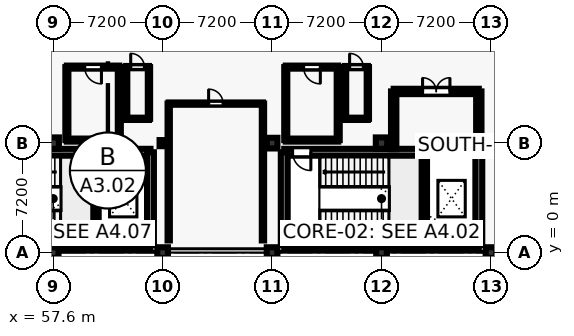
"""IFC4 building model, lengths in metres.
Left out: names, types, materials, properties, quantities, classifications, styles, units other than length and angle.
Written with IfcOpenShell. Run it as: python <this file> out.ifc"""

import sys

from ifc_helpers import new_model, si_unit, direction, frame, frame_2d, origin, origin_2d, place, context, subcontext, project, spatial, rectangle, hollow_rectangle, extrude, element, fill, save


model = new_model("IFC4")
c1 = context("Model", 3, precision=1e-05, world=origin(), true_north=direction((0.0, 1.0)))
c2 = subcontext(c1, "Body", "Model", "MODEL_VIEW")
j1 = project(units=[si_unit("LENGTHUNIT", "METRE"), si_unit("PLANEANGLEUNIT", "RADIAN")], contexts=[c1])
p1 = place(None, origin())
s1 = spatial("IfcSite", under=j1, at=p1, CompositionType="ELEMENT")
p2 = place(p1, origin())
s2 = spatial("IfcBuilding", under=s1, at=p2, CompositionType="ELEMENT")
p3 = place(p2, frame((0.0, 0.0, 9.6)))
s3 = spatial("IfcBuildingStorey", under=s2, at=p3, CompositionType="ELEMENT", Elevation=9.6)
p4 = place(p3, frame((57.6, 0.0, 0.0), z_axis=(0.0, 0.0, 1.0), x_axis=(1.0, 0.0, 0.0)))
e1 = element("IfcColumn", 1, at=p4, inside=s3, PredefinedType="COLUMN", context=c2, shape_type="SweptSolid", body=[
    extrude(rectangle(XDim=0.7, YDim=0.7, at=origin_2d()), origin(), (0.0, 0.0, 1.0), 4.2),
])
p5 = place(p3, frame((57.6, 7.2, 0.0), z_axis=(0.0, 0.0, 1.0), x_axis=(1.0, 0.0, 0.0)))
e2 = element("IfcColumn", 2, at=p5, inside=s3, PredefinedType="COLUMN", context=c2, shape_type="SweptSolid", body=[
    extrude(rectangle(XDim=0.75, YDim=0.75, at=origin_2d()), origin(), (0.0, 0.0, 1.0), 4.2),
])
p6 = place(p3, frame((64.8, 0.0, 0.0), z_axis=(0.0, 0.0, 1.0), x_axis=(1.0, 0.0, 0.0)))
e3 = element("IfcColumn", 3, at=p6, inside=s3, PredefinedType="COLUMN", context=c2, shape_type="SweptSolid", body=[
    extrude(rectangle(XDim=0.7, YDim=0.7, at=origin_2d()), origin(), (0.0, 0.0, 1.0), 4.2),
])
p7 = place(p3, frame((64.8, 7.2, 0.0), z_axis=(0.0, 0.0, 1.0), x_axis=(1.0, 0.0, 0.0)))
e4 = element("IfcColumn", 4, at=p7, inside=s3, PredefinedType="COLUMN", context=c2, shape_type="SweptSolid", body=[
    extrude(hollow_rectangle(XDim=0.4, YDim=0.4, WallThickness=0.02, at=origin_2d()), origin(), (0.0, 0.0, 1.0), 4.2),
])
for number, where, z_axis, x_axis in (
    (5, (72.0, 0.0, 0.0), (0.0, 0.0, 1.0), (1.0, 0.0, 0.0)),
    (6, (72.0, 7.2, 0.0), (0.0, 0.0, 1.0), (1.0, 0.0, 0.0)),
    (7, (79.2, 0.0, 0.0), (0.0, 0.0, 1.0), (1.0, 0.0, 0.0)),
):
    element("IfcColumn", number, at=place(p3, frame(where, z_axis=z_axis, x_axis=x_axis)), inside=s3, PredefinedType="COLUMN", context=c2, shape_type="SweptSolid", body=[
        extrude(rectangle(XDim=0.7, YDim=0.7, at=origin_2d()), origin(), (0.0, 0.0, 1.0), 4.2),
    ])
p8 = place(p3, frame((79.2, 7.2, 0.0), z_axis=(0.0, 0.0, 1.0), x_axis=(1.0, 0.0, 0.0)))
e8 = element("IfcColumn", 8, at=p8, inside=s3, PredefinedType="COLUMN", context=c2, shape_type="SweptSolid", body=[
    extrude(rectangle(XDim=0.75, YDim=0.75, at=origin_2d()), origin(), (0.0, 0.0, 1.0), 4.2),
])
p9 = place(p3, frame((86.4, 0.0, 0.0), z_axis=(0.0, 0.0, 1.0), x_axis=(1.0, 0.0, 0.0)))
e9 = element("IfcColumn", 9, at=p9, inside=s3, PredefinedType="COLUMN", context=c2, shape_type="SweptSolid", body=[
    extrude(rectangle(XDim=0.7, YDim=0.7, at=origin_2d()), origin(), (0.0, 0.0, 1.0), 4.2),
])
p10 = place(p3, frame((86.4, 7.2, 0.0), z_axis=(0.0, 0.0, 1.0), x_axis=(1.0, 0.0, 0.0)))
e10 = element("IfcColumn", 10, at=p10, inside=s3, PredefinedType="COLUMN", context=c2, shape_type="SweptSolid", body=[
    extrude(hollow_rectangle(XDim=0.4, YDim=0.4, WallThickness=0.02, at=origin_2d()), origin(), (0.0, 0.0, 1.0), 4.2),
])
p11 = place(p3, frame((72.8, 0.5, 0.0), z_axis=(0.0, 0.0, 1.0), x_axis=(1.0, 0.0, 0.0)))
e11 = element("IfcWall", 11, at=p11, inside=s3, PredefinedType="SHEAR", context=c2, shape_type="SweptSolid", body=[
    extrude(rectangle(XDim=12.8, YDim=0.45, at=frame_2d((6.4, 0.0))), origin(), (0.0, 0.0, 1.0), 3.88),
])
p12 = place(p3, frame((72.8, 6.6, 0.0), z_axis=(0.0, 0.0, 1.0), x_axis=(1.0, 0.0, 0.0)))
e12 = element("IfcWall", 12, at=p12, inside=s3, PredefinedType="SHEAR", context=c2, shape_type="SweptSolid", body=[
    extrude(rectangle(XDim=12.8, YDim=0.45, at=frame_2d((6.4, 0.0))), origin(), (0.0, 0.0, 1.0), 3.88),
])
p13 = place(p12, frame((0.55, 0.0, 0.0)))
e13 = element("IfcOpeningElement", 13, at=p13, cuts=e12, PredefinedType="OPENING", context=c2, shape_type="SweptSolid", body=[
    extrude(rectangle(XDim=1.2, YDim=2.25, at=frame_2d((0.6, 1.125))), frame((0.0, 0.235, 0.0), z_axis=(0.0, -1.0, 0.0), x_axis=(1.0, 0.0, 0.0)), (0.0, 0.0, 1.0), 0.47),
])
p14 = place(p12, frame((10.358, 0.0, 0.0)))
e14 = element("IfcOpeningElement", 14, at=p14, cuts=e12, PredefinedType="OPENING", context=c2, shape_type="SweptSolid", body=[
    extrude(rectangle(XDim=1.3, YDim=2.25, at=frame_2d((0.65, 1.125))), frame((0.0, 0.235, 0.0), z_axis=(0.0, -1.0, 0.0), x_axis=(1.0, 0.0, 0.0)), (0.0, 0.0, 1.0), 0.47),
])
for number, where, z_axis, x_axis in (
    (15, (72.8, 0.5, 0.0), (0.0, 0.0, 1.0), (0.0, 1.0, 0.0)),
    (16, (85.6, 0.5, 0.0), (0.0, 0.0, 1.0), (0.0, 1.0, 0.0)),
):
    element("IfcWall", number, at=place(p3, frame(where, z_axis=z_axis, x_axis=x_axis)), inside=s3, PredefinedType="SHEAR", context=c2, shape_type="SweptSolid", body=[
        extrude(rectangle(XDim=6.1, YDim=0.45, at=frame_2d((3.05, 0.0))), origin(), (0.0, 0.0, 1.0), 3.88),
    ])
p15 = place(p3, frame((82.016, 0.725, 0.0), z_axis=(0.0, 0.0, 1.0), x_axis=(0.0, 1.0, 0.0)))
e17 = element("IfcWall", 17, at=p15, inside=s3, PredefinedType="SHEAR", context=c2, shape_type="SweptSolid", body=[
    extrude(rectangle(XDim=5.65, YDim=0.35, at=frame_2d((2.825, 0.0))), origin(), (0.0, 0.0, 1.0), 3.88),
])
p16 = place(p3, frame((51.2, 0.5, 0.0), z_axis=(0.0, 0.0, 1.0), x_axis=(1.0, 0.0, 0.0)))
e18 = element("IfcWall", 18, at=p16, inside=s3, PredefinedType="SHEAR", context=c2, shape_type="SweptSolid", body=[
    extrude(rectangle(XDim=12.8, YDim=0.45, at=frame_2d((6.4, 0.0))), origin(), (0.0, 0.0, 1.0), 3.88),
])
p17 = place(p3, frame((51.2, 6.6, 0.0), z_axis=(0.0, 0.0, 1.0), x_axis=(1.0, 0.0, 0.0)))
e19 = element("IfcWall", 19, at=p17, inside=s3, PredefinedType="SHEAR", context=c2, shape_type="SweptSolid", body=[
    extrude(rectangle(XDim=12.8, YDim=0.45, at=frame_2d((6.4, 0.0))), origin(), (0.0, 0.0, 1.0), 3.88),
])
p18 = place(p17, frame((0.55, 0.0, 0.0)))
e20 = element("IfcOpeningElement", 20, at=p18, cuts=e19, PredefinedType="OPENING", context=c2, shape_type="SweptSolid", body=[
    extrude(rectangle(XDim=1.2, YDim=2.25, at=frame_2d((0.6, 1.125))), frame((0.0, 0.235, 0.0), z_axis=(0.0, -1.0, 0.0), x_axis=(1.0, 0.0, 0.0)), (0.0, 0.0, 1.0), 0.47),
])
p19 = place(p17, frame((10.458, 0.0, 0.0)))
e21 = element("IfcOpeningElement", 21, at=p19, cuts=e19, PredefinedType="OPENING", context=c2, shape_type="SweptSolid", body=[
    extrude(rectangle(XDim=1.1, YDim=2.2, at=frame_2d((0.55, 1.1))), frame((0.0, 0.235, 0.0), z_axis=(0.0, -1.0, 0.0), x_axis=(1.0, 0.0, 0.0)), (0.0, 0.0, 1.0), 0.47),
])
p20 = place(p3, frame((64.0, 0.5, 0.0), z_axis=(0.0, 0.0, 1.0), x_axis=(0.0, 1.0, 0.0)))
e22 = element("IfcWall", 22, at=p20, inside=s3, PredefinedType="SHEAR", context=c2, shape_type="SweptSolid", body=[
    extrude(rectangle(XDim=6.1, YDim=0.45, at=frame_2d((3.05, 0.0))), origin(), (0.0, 0.0, 1.0), 3.88),
])
p21 = place(p3, frame((60.416, 0.725, 0.0), z_axis=(0.0, 0.0, 1.0), x_axis=(0.0, 1.0, 0.0)))
e23 = element("IfcWall", 23, at=p21, inside=s3, PredefinedType="SHEAR", context=c2, shape_type="SweptSolid", body=[
    extrude(rectangle(XDim=5.65, YDim=0.35, at=frame_2d((2.825, 0.0))), origin(), (0.0, 0.0, 1.0), 3.88),
])
p22 = place(p3, frame((85.6, 6.8, 0.0), z_axis=(0.0, 0.0, 1.0), x_axis=(0.0, 1.0, 0.0)))
e24 = element("IfcWall", 24, at=p22, inside=s3, PredefinedType="SHEAR", context=c2, shape_type="SweptSolid", body=[
    extrude(rectangle(XDim=3.8, YDim=0.35, at=frame_2d((1.9, 0.0))), origin(), (0.0, 0.0, 1.0), 2.94),
])
p23 = place(p3, frame((85.6, 10.6, 0.0), z_axis=(0.0, 0.0, 1.0), x_axis=(-1.0, 0.0, 0.0)))
e25 = element("IfcWall", 25, at=p23, inside=s3, PredefinedType="SHEAR", context=c2, shape_type="SweptSolid", body=[
    extrude(rectangle(XDim=5.6, YDim=0.35, at=frame_2d((2.8, 0.0))), origin(), (0.0, 0.0, 1.0), 2.94),
])
p24 = place(p23, frame((1.9, 0.0, 0.0)))
e26 = element("IfcOpeningElement", 26, at=p24, cuts=e25, PredefinedType="OPENING", context=c2, shape_type="SweptSolid", body=[
    extrude(rectangle(XDim=1.8, YDim=2.3, at=frame_2d((0.9, 1.15))), frame((0.0, 0.185, 0.0), z_axis=(0.0, -1.0, 0.0), x_axis=(1.0, 0.0, 0.0)), (0.0, 0.0, 1.0), 0.37),
])
p25 = place(p3, frame((80.0, 10.6, 0.0), z_axis=(0.0, 0.0, 1.0), x_axis=(0.0, -1.0, 0.0)))
e27 = element("IfcWall", 27, at=p25, inside=s3, PredefinedType="SHEAR", context=c2, shape_type="SweptSolid", body=[
    extrude(rectangle(XDim=3.8, YDim=0.35, at=frame_2d((1.9, 0.0))), origin(), (0.0, 0.0, 1.0), 2.94),
])
p26 = place(p3, frame((71.4, 0.8, 0.0), z_axis=(0.0, 0.0, 1.0), x_axis=(0.0, 1.0, 0.0)))
e28 = element("IfcWall", 28, at=p26, inside=s3, PredefinedType="PARTITIONING", context=c2, shape_type="SweptSolid", body=[
    extrude(rectangle(XDim=9.0, YDim=0.15, at=frame_2d((4.5, 0.0))), origin(), (0.0, 0.0, 1.0), 2.94),
])
p27 = place(p3, frame((71.4, 9.8, 0.0), z_axis=(0.0, 0.0, 1.0), x_axis=(-1.0, 0.0, 0.0)))
e29 = element("IfcWall", 29, at=p27, inside=s3, PredefinedType="PARTITIONING", context=c2, shape_type="SweptSolid", body=[
    extrude(rectangle(XDim=6.2, YDim=0.15, at=frame_2d((3.1, 0.0))), origin(), (0.0, 0.0, 1.0), 2.94),
])
p28 = place(p27, frame((2.625, 0.0, 0.0)))
e30 = element("IfcOpeningElement", 30, at=p28, cuts=e29, PredefinedType="OPENING", context=c2, shape_type="SweptSolid", body=[
    extrude(rectangle(XDim=0.95, YDim=2.15, at=frame_2d((0.475, 1.075))), frame((0.0, 0.085, 0.0), z_axis=(0.0, -1.0, 0.0), x_axis=(1.0, 0.0, 0.0)), (0.0, 0.0, 1.0), 0.17),
])
p29 = place(p3, frame((65.2, 9.8, 0.0), z_axis=(0.0, 0.0, 1.0), x_axis=(0.0, -1.0, 0.0)))
e31 = element("IfcWall", 31, at=p29, inside=s3, PredefinedType="PARTITIONING", context=c2, shape_type="SweptSolid", body=[
    extrude(rectangle(XDim=9.0, YDim=0.15, at=frame_2d((4.5, 0.0))), origin(), (0.0, 0.0, 1.0), 2.94),
])
p30 = place(p3, frame((58.5, 7.4, 0.0), z_axis=(0.0, 0.0, 1.0), x_axis=(1.0, 0.0, 0.0)))
e32 = element("IfcWall", 32, at=p30, inside=s3, PredefinedType="PARTITIONING", context=c2, shape_type="SweptSolid", body=[
    extrude(rectangle(XDim=3.45, YDim=0.2, at=frame_2d((1.725, 0.0))), origin(), (0.0, 0.0, 1.0), 2.94),
])
p31 = place(p3, frame((61.95, 7.4, 0.0), z_axis=(0.0, 0.0, 1.0), x_axis=(0.0, 1.0, 0.0)))
e33 = element("IfcWall", 33, at=p31, inside=s3, PredefinedType="PARTITIONING", context=c2, shape_type="SweptSolid", body=[
    extrude(rectangle(XDim=4.8, YDim=0.2, at=frame_2d((2.4, 0.0))), origin(), (0.0, 0.0, 1.0), 2.94),
])
p32 = place(p3, frame((61.95, 12.2, 0.0), z_axis=(0.0, 0.0, 1.0), x_axis=(-1.0, 0.0, 0.0)))
e34 = element("IfcWall", 34, at=p32, inside=s3, PredefinedType="PARTITIONING", context=c2, shape_type="SweptSolid", body=[
    extrude(rectangle(XDim=3.45, YDim=0.2, at=frame_2d((1.725, 0.0))), origin(), (0.0, 0.0, 1.0), 2.94),
])
p33 = place(p32, frame((1.175, 0.0, 0.0)))
e35 = element("IfcOpeningElement", 35, at=p33, cuts=e34, PredefinedType="OPENING", context=c2, shape_type="SweptSolid", body=[
    extrude(rectangle(XDim=1.1, YDim=2.25, at=frame_2d((0.55, 1.125))), frame((0.0, 0.11, 0.0), z_axis=(0.0, -1.0, 0.0), x_axis=(1.0, 0.0, 0.0)), (0.0, 0.0, 1.0), 0.22),
])
p34 = place(p3, frame((58.5, 12.2, 0.0), z_axis=(0.0, 0.0, 1.0), x_axis=(0.0, -1.0, 0.0)))
e36 = element("IfcWall", 36, at=p34, inside=s3, PredefinedType="PARTITIONING", context=c2, shape_type="SweptSolid", body=[
    extrude(rectangle(XDim=4.8, YDim=0.2, at=frame_2d((2.4, 0.0))), origin(), (0.0, 0.0, 1.0), 2.94),
])
p35 = place(p3, frame((62.4, 8.8, 0.0), z_axis=(0.0, 0.0, 1.0), x_axis=(1.0, 0.0, 0.0)))
e37 = element("IfcWall", 37, at=p35, inside=s3, PredefinedType="PARTITIONING", context=c2, shape_type="SweptSolid", body=[
    extrude(rectangle(XDim=1.5, YDim=0.15, at=frame_2d((0.75, 0.0))), origin(), (0.0, 0.0, 1.0), 2.94),
])
p36 = place(p3, frame((63.9, 8.8, 0.0), z_axis=(0.0, 0.0, 1.0), x_axis=(0.0, 1.0, 0.0)))
e38 = element("IfcWall", 38, at=p36, inside=s3, PredefinedType="PARTITIONING", context=c2, shape_type="SweptSolid", body=[
    extrude(rectangle(XDim=3.4, YDim=0.15, at=frame_2d((1.7, 0.0))), origin(), (0.0, 0.0, 1.0), 2.94),
])
p37 = place(p3, frame((63.9, 12.2, 0.0), z_axis=(0.0, 0.0, 1.0), x_axis=(-1.0, 0.0, 0.0)))
e39 = element("IfcWall", 39, at=p37, inside=s3, PredefinedType="PARTITIONING", context=c2, shape_type="SweptSolid", body=[
    extrude(rectangle(XDim=1.5, YDim=0.15, at=frame_2d((0.75, 0.0))), origin(), (0.0, 0.0, 1.0), 2.94),
])
p38 = place(p37, frame((0.3, 0.0, 0.0)))
e40 = element("IfcOpeningElement", 40, at=p38, cuts=e39, PredefinedType="OPENING", context=c2, shape_type="SweptSolid", body=[
    extrude(rectangle(XDim=0.9, YDim=2.15, at=frame_2d((0.45, 1.075))), frame((0.0, 0.085, 0.0), z_axis=(0.0, -1.0, 0.0), x_axis=(1.0, 0.0, 0.0)), (0.0, 0.0, 1.0), 0.17),
])
p39 = place(p3, frame((62.4, 12.2, 0.0), z_axis=(0.0, 0.0, 1.0), x_axis=(0.0, -1.0, 0.0)))
e41 = element("IfcWall", 41, at=p39, inside=s3, PredefinedType="PARTITIONING", context=c2, shape_type="SweptSolid", body=[
    extrude(rectangle(XDim=3.4, YDim=0.15, at=frame_2d((1.7, 0.0))), origin(), (0.0, 0.0, 1.0), 2.94),
])
p40 = place(p3, frame((72.9, 7.4, 0.0), z_axis=(0.0, 0.0, 1.0), x_axis=(1.0, 0.0, 0.0)))
e42 = element("IfcWall", 42, at=p40, inside=s3, PredefinedType="PARTITIONING", context=c2, shape_type="SweptSolid", body=[
    extrude(rectangle(XDim=3.45, YDim=0.2, at=frame_2d((1.725, 0.0))), origin(), (0.0, 0.0, 1.0), 2.94),
])
p41 = place(p3, frame((76.35, 7.4, 0.0), z_axis=(0.0, 0.0, 1.0), x_axis=(0.0, 1.0, 0.0)))
e43 = element("IfcWall", 43, at=p41, inside=s3, PredefinedType="PARTITIONING", context=c2, shape_type="SweptSolid", body=[
    extrude(rectangle(XDim=4.8, YDim=0.2, at=frame_2d((2.4, 0.0))), origin(), (0.0, 0.0, 1.0), 2.94),
])
p42 = place(p3, frame((76.35, 12.2, 0.0), z_axis=(0.0, 0.0, 1.0), x_axis=(-1.0, 0.0, 0.0)))
e44 = element("IfcWall", 44, at=p42, inside=s3, PredefinedType="PARTITIONING", context=c2, shape_type="SweptSolid", body=[
    extrude(rectangle(XDim=3.45, YDim=0.2, at=frame_2d((1.725, 0.0))), origin(), (0.0, 0.0, 1.0), 2.94),
])
p43 = place(p42, frame((1.175, 0.0, 0.0)))
e45 = element("IfcOpeningElement", 45, at=p43, cuts=e44, PredefinedType="OPENING", context=c2, shape_type="SweptSolid", body=[
    extrude(rectangle(XDim=1.1, YDim=2.25, at=frame_2d((0.55, 1.125))), frame((0.0, 0.11, 0.0), z_axis=(0.0, -1.0, 0.0), x_axis=(1.0, 0.0, 0.0)), (0.0, 0.0, 1.0), 0.22),
])
p44 = place(p3, frame((72.9, 12.2, 0.0), z_axis=(0.0, 0.0, 1.0), x_axis=(0.0, -1.0, 0.0)))
e46 = element("IfcWall", 46, at=p44, inside=s3, PredefinedType="PARTITIONING", context=c2, shape_type="SweptSolid", body=[
    extrude(rectangle(XDim=4.8, YDim=0.2, at=frame_2d((2.4, 0.0))), origin(), (0.0, 0.0, 1.0), 2.94),
])
p45 = place(p3, frame((76.8, 8.8, 0.0), z_axis=(0.0, 0.0, 1.0), x_axis=(1.0, 0.0, 0.0)))
e47 = element("IfcWall", 47, at=p45, inside=s3, PredefinedType="PARTITIONING", context=c2, shape_type="SweptSolid", body=[
    extrude(rectangle(XDim=1.5, YDim=0.15, at=frame_2d((0.75, 0.0))), origin(), (0.0, 0.0, 1.0), 2.94),
])
p46 = place(p3, frame((78.3, 8.8, 0.0), z_axis=(0.0, 0.0, 1.0), x_axis=(0.0, 1.0, 0.0)))
e48 = element("IfcWall", 48, at=p46, inside=s3, PredefinedType="PARTITIONING", context=c2, shape_type="SweptSolid", body=[
    extrude(rectangle(XDim=3.4, YDim=0.15, at=frame_2d((1.7, 0.0))), origin(), (0.0, 0.0, 1.0), 2.94),
])
p47 = place(p3, frame((78.3, 12.2, 0.0), z_axis=(0.0, 0.0, 1.0), x_axis=(-1.0, 0.0, 0.0)))
e49 = element("IfcWall", 49, at=p47, inside=s3, PredefinedType="PARTITIONING", context=c2, shape_type="SweptSolid", body=[
    extrude(rectangle(XDim=1.5, YDim=0.15, at=frame_2d((0.75, 0.0))), origin(), (0.0, 0.0, 1.0), 2.94),
])
p48 = place(p47, frame((0.3, 0.0, 0.0)))
e50 = element("IfcOpeningElement", 50, at=p48, cuts=e49, PredefinedType="OPENING", context=c2, shape_type="SweptSolid", body=[
    extrude(rectangle(XDim=0.9, YDim=2.15, at=frame_2d((0.45, 1.075))), frame((0.0, 0.085, 0.0), z_axis=(0.0, -1.0, 0.0), x_axis=(1.0, 0.0, 0.0)), (0.0, 0.0, 1.0), 0.17),
])
p49 = place(p3, frame((76.8, 12.2, 0.0), z_axis=(0.0, 0.0, 1.0), x_axis=(0.0, -1.0, 0.0)))
e51 = element("IfcWall", 51, at=p49, inside=s3, PredefinedType="PARTITIONING", context=c2, shape_type="SweptSolid", body=[
    extrude(rectangle(XDim=3.4, YDim=0.15, at=frame_2d((1.7, 0.0))), origin(), (0.0, 0.0, 1.0), 2.94),
])
p50 = place(p13, frame((1.2, 0.0, 0.0), z_axis=(0.0, 0.0, 1.0), x_axis=(-1.0, 0.0, 0.0)))
e52 = element("IfcDoor", 52, at=p50, inside=s3, OperationType="SINGLE_SWING_RIGHT", PredefinedType="DOOR", context=c2, shape_type="SweptSolid", body=[
    extrude(rectangle(XDim=1.2, YDim=2.25, at=frame_2d((0.6, 1.125))), frame((0.0, 0.025, 0.0), z_axis=(0.0, -1.0, 0.0), x_axis=(1.0, 0.0, 0.0)), (0.0, 0.0, 1.0), 0.05),
])
fill(e13, e52)
p51 = place(p14, origin())
e53 = element("IfcDoor", 53, at=p51, inside=s3, OperationType="SLIDING_TO_RIGHT", PredefinedType="DOOR", context=c2, shape_type="SweptSolid", body=[
    extrude(rectangle(XDim=1.3, YDim=2.25, at=frame_2d((0.65, 1.125))), frame((0.0, 0.025, 0.0), z_axis=(0.0, -1.0, 0.0), x_axis=(1.0, 0.0, 0.0)), (0.0, 0.0, 1.0), 0.05),
])
fill(e14, e53)
p52 = place(p19, origin())
e54 = element("IfcDoor", 54, at=p52, inside=s3, OperationType="SLIDING_TO_LEFT", PredefinedType="DOOR", context=c2, shape_type="SweptSolid", body=[
    extrude(rectangle(XDim=1.1, YDim=2.2, at=frame_2d((0.55, 1.1))), frame((0.0, 0.025, 0.0), z_axis=(0.0, -1.0, 0.0), x_axis=(1.0, 0.0, 0.0)), (0.0, 0.0, 1.0), 0.05),
])
fill(e21, e54)
p53 = place(p24, frame((1.8, 0.0, 0.0), z_axis=(0.0, 0.0, 1.0), x_axis=(-1.0, 0.0, 0.0)))
e55 = element("IfcDoor", 55, at=p53, inside=s3, OperationType="DOUBLE_DOOR_SINGLE_SWING", PredefinedType="DOOR", context=c2, shape_type="SweptSolid", body=[
    extrude(rectangle(XDim=1.8, YDim=2.3, at=frame_2d((0.9, 1.15))), frame((0.0, 0.025, 0.0), z_axis=(0.0, -1.0, 0.0), x_axis=(1.0, 0.0, 0.0)), (0.0, 0.0, 1.0), 0.05),
])
fill(e26, e55)
p54 = place(p28, frame((0.95, 0.0, 0.0), z_axis=(0.0, 0.0, 1.0), x_axis=(-1.0, 0.0, 0.0)))
e56 = element("IfcDoor", 56, at=p54, inside=s3, OperationType="SINGLE_SWING_RIGHT", PredefinedType="DOOR", context=c2, shape_type="SweptSolid", body=[
    extrude(rectangle(XDim=0.95, YDim=2.15, at=frame_2d((0.475, 1.075))), frame((0.0, 0.025, 0.0), z_axis=(0.0, -1.0, 0.0), x_axis=(1.0, 0.0, 0.0)), (0.0, 0.0, 1.0), 0.05),
])
fill(e30, e56)
p55 = place(p33, origin())
e57 = element("IfcDoor", 57, at=p55, inside=s3, OperationType="SINGLE_SWING_LEFT", PredefinedType="DOOR", context=c2, shape_type="SweptSolid", body=[
    extrude(rectangle(XDim=1.1, YDim=2.25, at=frame_2d((0.55, 1.125))), frame((0.0, 0.025, 0.0), z_axis=(0.0, -1.0, 0.0), x_axis=(1.0, 0.0, 0.0)), (0.0, 0.0, 1.0), 0.05),
])
fill(e35, e57)
p56 = place(p38, frame((0.9, 0.0, 0.0), z_axis=(0.0, 0.0, 1.0), x_axis=(-1.0, 0.0, 0.0)))
e58 = element("IfcDoor", 58, at=p56, inside=s3, OperationType="SINGLE_SWING_RIGHT", PredefinedType="DOOR", context=c2, shape_type="SweptSolid", body=[
    extrude(rectangle(XDim=0.9, YDim=2.15, at=frame_2d((0.45, 1.075))), frame((0.0, 0.025, 0.0), z_axis=(0.0, -1.0, 0.0), x_axis=(1.0, 0.0, 0.0)), (0.0, 0.0, 1.0), 0.05),
])
fill(e40, e58)
p57 = place(p43, origin())
e59 = element("IfcDoor", 59, at=p57, inside=s3, OperationType="SINGLE_SWING_LEFT", PredefinedType="DOOR", context=c2, shape_type="SweptSolid", body=[
    extrude(rectangle(XDim=1.1, YDim=2.25, at=frame_2d((0.55, 1.125))), frame((0.0, 0.025, 0.0), z_axis=(0.0, -1.0, 0.0), x_axis=(1.0, 0.0, 0.0)), (0.0, 0.0, 1.0), 0.05),
])
fill(e45, e59)
p58 = place(p48, frame((0.9, 0.0, 0.0), z_axis=(0.0, 0.0, 1.0), x_axis=(-1.0, 0.0, 0.0)))
e60 = element("IfcDoor", 60, at=p58, inside=s3, OperationType="SINGLE_SWING_RIGHT", PredefinedType="DOOR", context=c2, shape_type="SweptSolid", body=[
    extrude(rectangle(XDim=0.9, YDim=2.15, at=frame_2d((0.45, 1.075))), frame((0.0, 0.025, 0.0), z_axis=(0.0, -1.0, 0.0), x_axis=(1.0, 0.0, 0.0)), (0.0, 0.0, 1.0), 0.05),
])
fill(e50, e60)
save(model, sys.argv[1])
